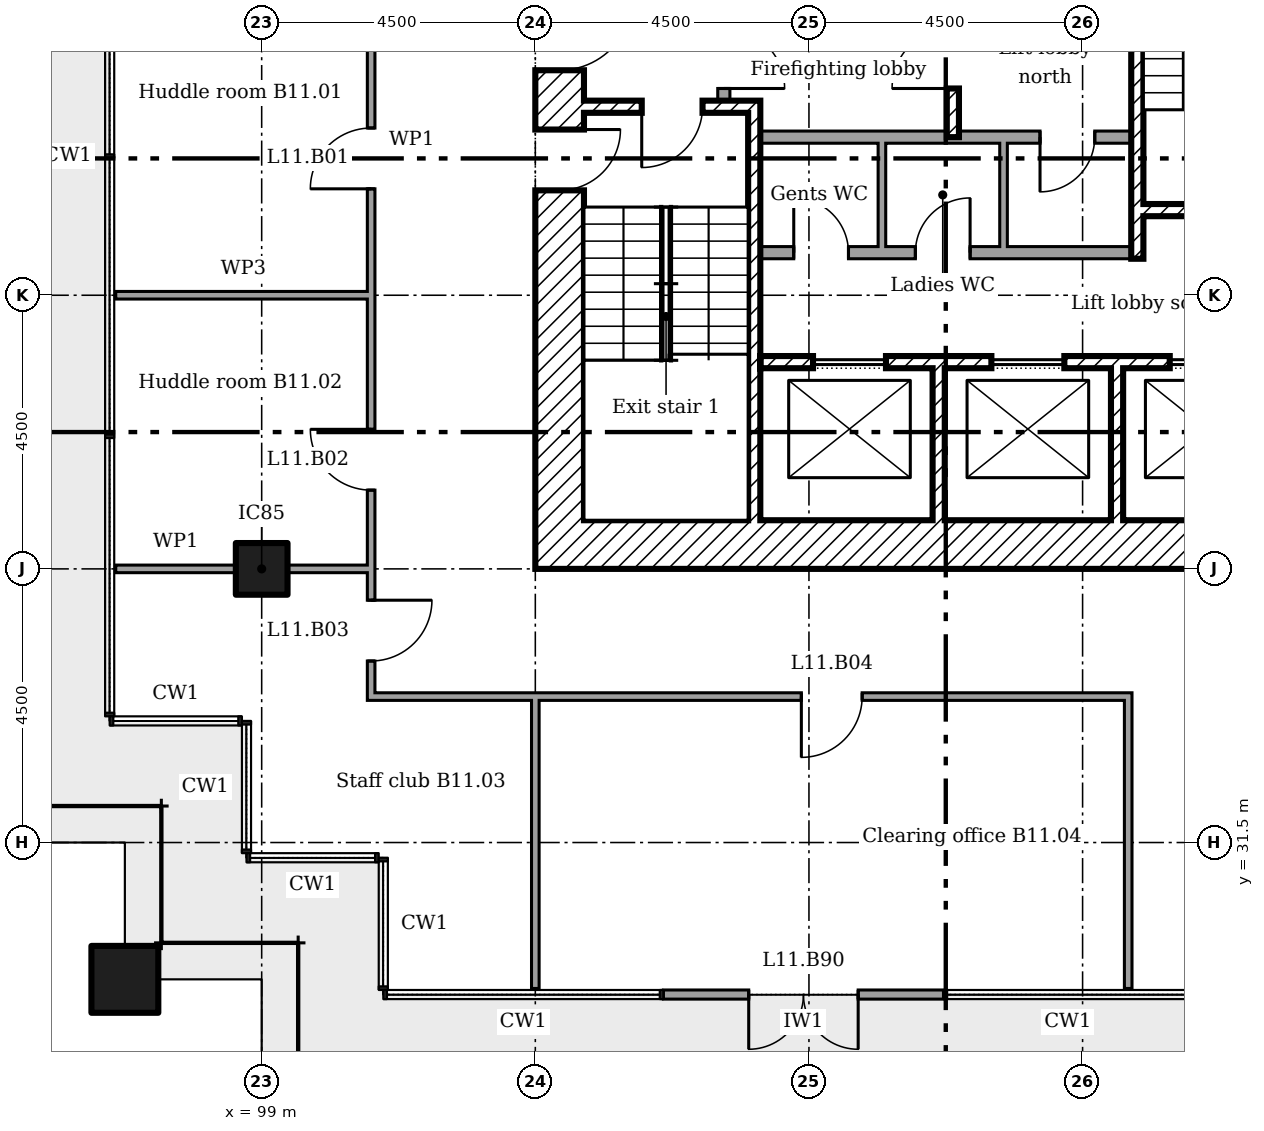
"""IFC4 building model, lengths in metres.
Left out: names, types, materials, properties, quantities, classifications, styles, units other than length and angle.
Written with IfcOpenShell. Run it as: python <this file> out.ifc"""

import sys

from ifc_helpers import new_model, si_unit, direction, frame, frame_2d, origin, origin_2d, place, context, subcontext, project, spatial, rectangle, extrude, element, fill, save


model = new_model("IFC4")
c1 = context("Model", 3, precision=1e-05, world=origin(), true_north=direction((0.0, 1.0)))
c2 = subcontext(c1, "Body", "Model", "MODEL_VIEW")
j1 = project(units=[si_unit("LENGTHUNIT", "METRE"), si_unit("PLANEANGLEUNIT", "RADIAN")], contexts=[c1])
p1 = place(None, origin())
s1 = spatial("IfcSite", under=j1, at=p1, CompositionType="ELEMENT")
p2 = place(p1, origin())
s2 = spatial("IfcBuilding", under=s1, at=p2, CompositionType="ELEMENT")
p3 = place(p2, frame((0.0, 0.0, 51.0)))
s3 = spatial("IfcBuildingStorey", under=s2, at=p3, CompositionType="ELEMENT", Elevation=51.0)
p4 = place(p3, frame((96.75, 29.25, 0.0)))
e1 = element("IfcColumn", 1, at=p4, inside=s3, PredefinedType="COLUMN", context=c2, shape_type="SweptSolid", body=[
    extrude(rectangle(XDim=1.1, YDim=1.1, at=origin_2d()), origin(), (0.0, 0.0, 1.0), 3.6),
])
p5 = place(p3, frame((99.0, 36.0, 0.0)))
e2 = element("IfcColumn", 2, at=p5, inside=s3, PredefinedType="COLUMN", context=c2, shape_type="SweptSolid", body=[
    extrude(rectangle(XDim=0.85, YDim=0.85, at=origin_2d()), origin(), (0.0, 0.0, 1.0), 3.6),
])
p6 = place(p3, frame((105.606, 29.0, 0.0)))
e3 = element("IfcWall", 3, at=p6, inside=s3, PredefinedType="SOLIDWALL", context=c2, shape_type="SweptSolid", body=[
    extrude(rectangle(XDim=4.606, YDim=0.15, at=frame_2d((2.303, 0.0))), origin(), (0.0, 0.0, 1.0), 3.45),
])
p7 = place(p6, frame((1.403, 0.0, 0.0)))
e4 = element("IfcOpeningElement", 4, at=p7, cuts=e3, PredefinedType="OPENING", context=c2, shape_type="SweptSolid", body=[
    extrude(rectangle(XDim=1.8, YDim=2.4, at=frame_2d((0.9, 1.2))), frame((0.0, 0.085, 0.0), z_axis=(0.0, -1.0, 0.0), x_axis=(1.0, 0.0, 0.0)), (0.0, 0.0, 1.0), 0.17),
])
p8 = place(p3, frame((104.3, 36.4, 0.0)))
e5 = element("IfcWall", 5, at=p8, inside=s3, PredefinedType="SHEAR", context=c2, shape_type="SweptSolid", body=[
    extrude(rectangle(XDim=11.9, YDim=0.8, at=frame_2d((5.95, 0.0))), origin(), (0.0, 0.0, 1.0), 3.35),
])
p9 = place(p3, frame((103.9, 36.0, 0.0), z_axis=(0.0, 0.0, 1.0), x_axis=(0.0, 1.0, 0.0)))
e6 = element("IfcWall", 6, at=p9, inside=s3, PredefinedType="SHEAR", context=c2, shape_type="SweptSolid", body=[
    extrude(rectangle(XDim=13.5, YDim=0.8, at=frame_2d((6.75, 0.0))), origin(), (0.0, 0.0, 1.0), 3.35),
])
p10 = place(p9, frame((8.2, 0.0, 0.0)))
e7 = element("IfcOpeningElement", 7, at=p10, cuts=e6, PredefinedType="OPENING", context=c2, shape_type="SweptSolid", body=[
    extrude(rectangle(XDim=1.2, YDim=2.1, at=frame_2d((0.6, 1.05))), frame((0.0, 0.41, 0.0), z_axis=(0.0, -1.0, 0.0), x_axis=(1.0, 0.0, 0.0)), (0.0, 0.0, 1.0), 0.82),
])
p11 = place(p9, frame((6.225, 0.0, 0.0)))
e8 = element("IfcOpeningElement", 8, at=p11, cuts=e6, PredefinedType="OPENING", context=c2, shape_type="SweptSolid", body=[
    extrude(rectangle(XDim=1.0, YDim=2.1, at=frame_2d((0.5, 1.05))), frame((0.0, 0.41, 0.0), z_axis=(0.0, -1.0, 0.0), x_axis=(1.0, 0.0, 0.0)), (0.0, 0.0, 1.0), 0.82),
])
p12 = place(p3, frame((110.367, 48.7, 0.0), z_axis=(0.0, 0.0, 1.0), x_axis=(0.0, -1.0, 0.0)))
e9 = element("IfcWall", 9, at=p12, inside=s3, PredefinedType="SHEAR", context=c2, shape_type="SweptSolid", body=[
    extrude(rectangle(XDim=5.6, YDim=0.2, at=frame_2d((2.8, 0.0))), origin(), (0.0, 0.0, 1.0), 3.35),
])
p13 = place(p12, frame((3.8, 0.0, 0.0)))
e10 = element("IfcOpeningElement", 10, at=p13, cuts=e9, PredefinedType="OPENING", context=c2, shape_type="SweptSolid", body=[
    extrude(rectangle(XDim=1.0, YDim=2.1, at=frame_2d((0.5, 1.05))), frame((0.0, 0.11, 0.0), z_axis=(0.0, -1.0, 0.0), x_axis=(1.0, 0.0, 0.0)), (0.0, 0.0, 1.0), 0.22),
])
for number, where, z_axis, x_axis in (
    (11, (110.133, 36.8, 0.0), (0.0, 0.0, 1.0), (0.0, 1.0, 0.0)),
    (12, (113.067, 36.8, 0.0), (0.0, 0.0, 1.0), (0.0, 1.0, 0.0)),
):
    element("IfcWall", number, at=place(p3, frame(where, z_axis=z_axis, x_axis=x_axis)), inside=s3, PredefinedType="SHEAR", context=c2, shape_type="SweptSolid", body=[
        extrude(rectangle(XDim=2.5, YDim=0.2, at=frame_2d((1.25, 0.0))), origin(), (0.0, 0.0, 1.0), 3.35),
    ])
p14 = place(p3, frame((106.6, 43.7, 0.0), z_axis=(0.0, 0.0, 1.0), x_axis=(0.0, 1.0, 0.0)))
e13 = element("IfcWall", 13, at=p14, inside=s3, PredefinedType="PARTITIONING", context=c2, shape_type="SweptSolid", body=[
    extrude(rectangle(XDim=1.5, YDim=0.2, at=frame_2d((0.75, 0.0))), origin(), (0.0, 0.0, 1.0), 3.35),
])
p15 = place(p14, frame((0.2, 0.0, 0.0)))
e14 = element("IfcOpeningElement", 14, at=p15, cuts=e13, PredefinedType="OPENING", context=c2, shape_type="SweptSolid", body=[
    extrude(rectangle(XDim=1.0, YDim=2.1, at=frame_2d((0.5, 1.05))), frame((0.0, 0.11, 0.0), z_axis=(0.0, -1.0, 0.0), x_axis=(1.0, 0.0, 0.0)), (0.0, 0.0, 1.0), 0.22),
])
p16 = place(p3, frame((107.2, 39.4, 0.0)))
e15 = element("IfcWall", 15, at=p16, inside=s3, PredefinedType="SHEAR", context=c2, shape_type="SweptSolid", body=[
    extrude(rectangle(XDim=9.0, YDim=0.2, at=frame_2d((4.5, 0.0))), origin(), (0.0, 0.0, 1.0), 3.35),
])
p17 = place(p16, frame((0.867, 0.0, 0.0)))
e16 = element("IfcOpeningElement", 16, at=p17, cuts=e15, PredefinedType="OPENING", context=c2, shape_type="SweptSolid", body=[
    extrude(rectangle(XDim=1.2, YDim=2.1, at=frame_2d((0.6, 1.05))), frame((0.0, 0.11, 0.0), z_axis=(0.0, -1.0, 0.0), x_axis=(1.0, 0.0, 0.0)), (0.0, 0.0, 1.0), 0.22),
])
p18 = place(p16, frame((3.8, 0.0, 0.0)))
e17 = element("IfcOpeningElement", 17, at=p18, cuts=e15, PredefinedType="OPENING", context=c2, shape_type="SweptSolid", body=[
    extrude(rectangle(XDim=1.2, YDim=2.1, at=frame_2d((0.6, 1.05))), frame((0.0, 0.11, 0.0), z_axis=(0.0, -1.0, 0.0), x_axis=(1.0, 0.0, 0.0)), (0.0, 0.0, 1.0), 0.22),
])
p19 = place(p16, frame((6.733, 0.0, 0.0)))
e18 = element("IfcOpeningElement", 18, at=p19, cuts=e15, PredefinedType="OPENING", context=c2, shape_type="SweptSolid", body=[
    extrude(rectangle(XDim=1.2, YDim=2.1, at=frame_2d((0.6, 1.05))), frame((0.0, 0.11, 0.0), z_axis=(0.0, -1.0, 0.0), x_axis=(1.0, 0.0, 0.0)), (0.0, 0.0, 1.0), 0.22),
])
p20 = place(p3, frame((107.1, 36.8, 0.0), z_axis=(0.0, 0.0, 1.0), x_axis=(0.0, 1.0, 0.0)))
e19 = element("IfcWall", 19, at=p20, inside=s3, PredefinedType="SHEAR", context=c2, shape_type="SweptSolid", body=[
    extrude(rectangle(XDim=6.9, YDim=0.2, at=frame_2d((3.45, 0.0))), origin(), (0.0, 0.0, 1.0), 3.35),
])
p21 = place(p3, frame((104.3, 43.6, 0.0)))
e20 = element("IfcWall", 20, at=p21, inside=s3, PredefinedType="SHEAR", context=c2, shape_type="SweptSolid", body=[
    extrude(rectangle(XDim=2.7, YDim=0.2, at=frame_2d((1.35, 0.0))), origin(), (0.0, 0.0, 1.0), 3.35),
])
p22 = place(p21, frame((0.95, 0.0, 0.0)))
e21 = element("IfcOpeningElement", 21, at=p22, cuts=e20, PredefinedType="OPENING", context=c2, shape_type="SweptSolid", body=[
    extrude(rectangle(XDim=1.0, YDim=2.1, at=frame_2d((0.5, 1.05))), frame((0.0, 0.11, 0.0), z_axis=(0.0, -1.0, 0.0), x_axis=(1.0, 0.0, 0.0)), (0.0, 0.0, 1.0), 0.22),
])
p23 = place(p3, frame((113.5, 41.9, 0.0)))
e22 = element("IfcWall", 22, at=p23, inside=s3, PredefinedType="SHEAR", context=c2, shape_type="SweptSolid", body=[
    extrude(rectangle(XDim=2.7, YDim=0.2, at=frame_2d((1.35, 0.0))), origin(), (0.0, 0.0, 1.0), 3.35),
])
p24 = place(p23, frame((0.75, 0.0, 0.0)))
e23 = element("IfcOpeningElement", 23, at=p24, cuts=e22, PredefinedType="OPENING", context=c2, shape_type="SweptSolid", body=[
    extrude(rectangle(XDim=1.0, YDim=2.1, at=frame_2d((0.5, 1.05))), frame((0.0, 0.11, 0.0), z_axis=(0.0, -1.0, 0.0), x_axis=(1.0, 0.0, 0.0)), (0.0, 0.0, 1.0), 0.22),
])
p25 = place(p3, frame((113.4, 41.1, 0.0), z_axis=(0.0, 0.0, 1.0), x_axis=(0.0, 1.0, 0.0)))
e24 = element("IfcWall", 24, at=p25, inside=s3, PredefinedType="SHEAR", context=c2, shape_type="SweptSolid", body=[
    extrude(rectangle(XDim=7.6, YDim=0.2, at=frame_2d((3.8, 0.0))), origin(), (0.0, 0.0, 1.0), 3.35),
])
p26 = place(p3, frame((107.2, 43.1, 0.0)))
e25 = element("IfcWall", 25, at=p26, inside=s3, PredefinedType="PARTITIONING", context=c2, shape_type="SweptSolid", body=[
    extrude(rectangle(XDim=6.1, YDim=0.2, at=frame_2d((3.05, 0.0))), origin(), (0.0, 0.0, 1.0), 3.35),
])
p27 = place(p26, frame((4.6, 0.0, 0.0)))
e26 = element("IfcOpeningElement", 26, at=p27, cuts=e25, PredefinedType="OPENING", context=c2, shape_type="SweptSolid", body=[
    extrude(rectangle(XDim=0.9, YDim=2.1, at=frame_2d((0.45, 1.05))), frame((0.0, 0.11, 0.0), z_axis=(0.0, -1.0, 0.0), x_axis=(1.0, 0.0, 0.0)), (0.0, 0.0, 1.0), 0.22),
])
p28 = place(p3, frame((107.2, 41.2, 0.0)))
e27 = element("IfcWall", 27, at=p28, inside=s3, PredefinedType="PARTITIONING", context=c2, shape_type="SweptSolid", body=[
    extrude(rectangle(XDim=6.1, YDim=0.2, at=frame_2d((3.05, 0.0))), origin(), (0.0, 0.0, 1.0), 3.35),
])
p29 = place(p28, frame((0.55, 0.0, 0.0)))
e28 = element("IfcOpeningElement", 28, at=p29, cuts=e27, PredefinedType="OPENING", context=c2, shape_type="SweptSolid", body=[
    extrude(rectangle(XDim=0.9, YDim=2.1, at=frame_2d((0.45, 1.05))), frame((0.0, 0.11, 0.0), z_axis=(0.0, -1.0, 0.0), x_axis=(1.0, 0.0, 0.0)), (0.0, 0.0, 1.0), 0.22),
])
p30 = place(p28, frame((2.55, 0.0, 0.0)))
e29 = element("IfcOpeningElement", 29, at=p30, cuts=e27, PredefinedType="OPENING", context=c2, shape_type="SweptSolid", body=[
    extrude(rectangle(XDim=0.9, YDim=2.1, at=frame_2d((0.45, 1.05))), frame((0.0, 0.11, 0.0), z_axis=(0.0, -1.0, 0.0), x_axis=(1.0, 0.0, 0.0)), (0.0, 0.0, 1.0), 0.22),
])
for number, where, z_axis, x_axis in (
    (30, (109.2, 41.3, 0.0), (0.0, 0.0, 1.0), (0.0, 1.0, 0.0)),
    (31, (111.2, 41.3, 0.0), (0.0, 0.0, 1.0), (0.0, 1.0, 0.0)),
):
    element("IfcWall", number, at=place(p3, frame(where, z_axis=z_axis, x_axis=x_axis)), inside=s3, PredefinedType="PARTITIONING", context=c2, shape_type="SweptSolid", body=[
        extrude(rectangle(XDim=1.7, YDim=0.125, at=frame_2d((0.85, 0.0))), origin(), (0.0, 0.0, 1.0), 3.35),
    ])
p31 = place(p3, frame((100.738, 33.9, 0.0)))
e32 = element("IfcWall", 32, at=p31, inside=s3, PredefinedType="PARTITIONING", context=c2, shape_type="SweptSolid", body=[
    extrude(rectangle(XDim=12.575, YDim=0.125, at=frame_2d((6.288, 0.0))), origin(), (0.0, 0.0, 1.0), 3.45),
])
p32 = place(p31, frame((7.137, 0.0, 0.0)))
e33 = element("IfcOpeningElement", 33, at=p32, cuts=e32, PredefinedType="OPENING", context=c2, shape_type="SweptSolid", body=[
    extrude(rectangle(XDim=1.0, YDim=2.1, at=frame_2d((0.5, 1.05))), frame((0.0, 0.073, 0.0), z_axis=(0.0, -1.0, 0.0), x_axis=(1.0, 0.0, 0.0)), (0.0, 0.0, 1.0), 0.145),
])
p33 = place(p3, frame((96.6, 36.0, 0.0)))
e34 = element("IfcWall", 34, at=p33, inside=s3, PredefinedType="PARTITIONING", context=c2, shape_type="SweptSolid", body=[
    extrude(rectangle(XDim=1.975, YDim=0.125, at=frame_2d((0.987, 0.0))), origin(), (0.0, 0.0, 1.0), 2.842),
])
p34 = place(p3, frame((99.425, 36.0, 0.0)))
e35 = element("IfcWall", 35, at=p34, inside=s3, PredefinedType="PARTITIONING", context=c2, shape_type="SweptSolid", body=[
    extrude(rectangle(XDim=1.375, YDim=0.125, at=frame_2d((0.688, 0.0))), origin(), (0.0, 0.0, 1.0), 2.842),
])
p35 = place(p3, frame((96.6, 40.5, 0.0)))
e36 = element("IfcWall", 36, at=p35, inside=s3, PredefinedType="MOVABLE", context=c2, shape_type="SweptSolid", body=[
    extrude(rectangle(XDim=4.2, YDim=0.125, at=frame_2d((2.1, 0.0))), origin(), (0.0, 0.0, 1.0), 2.851),
])
p36 = place(p3, frame((100.8, 33.962, 0.0), z_axis=(0.0, 0.0, 1.0), x_axis=(0.0, 1.0, 0.0)))
e37 = element("IfcWall", 37, at=p36, inside=s3, PredefinedType="PARTITIONING", context=c2, shape_type="SweptSolid", body=[
    extrude(rectangle(XDim=18.175, YDim=0.125, at=frame_2d((9.087, 0.0))), origin(), (0.0, 0.0, 1.0), 3.45),
])
p37 = place(p36, frame((8.288, 0.0, 0.0)))
e38 = element("IfcOpeningElement", 38, at=p37, cuts=e37, PredefinedType="OPENING", context=c2, shape_type="SweptSolid", body=[
    extrude(rectangle(XDim=1.0, YDim=2.1, at=frame_2d((0.5, 1.05))), frame((0.0, 0.073, 0.0), z_axis=(0.0, -1.0, 0.0), x_axis=(1.0, 0.0, 0.0)), (0.0, 0.0, 1.0), 0.145),
])
p38 = place(p36, frame((3.333, 0.0, 0.0)))
e39 = element("IfcOpeningElement", 39, at=p38, cuts=e37, PredefinedType="OPENING", context=c2, shape_type="SweptSolid", body=[
    extrude(rectangle(XDim=1.0, YDim=2.1, at=frame_2d((0.5, 1.05))), frame((0.0, 0.073, 0.0), z_axis=(0.0, -1.0, 0.0), x_axis=(1.0, 0.0, 0.0)), (0.0, 0.0, 1.0), 0.145),
])
p39 = place(p36, frame((0.522, 0.0, 0.0)))
e40 = element("IfcOpeningElement", 40, at=p39, cuts=e37, PredefinedType="OPENING", context=c2, shape_type="SweptSolid", body=[
    extrude(rectangle(XDim=1.0, YDim=2.1, at=frame_2d((0.5, 1.05))), frame((0.0, 0.073, 0.0), z_axis=(0.0, -1.0, 0.0), x_axis=(1.0, 0.0, 0.0)), (0.0, 0.0, 1.0), 0.145),
])
p40 = place(p36, frame((16.248, 0.0, 0.0)))
e41 = element("IfcOpeningElement", 41, at=p40, cuts=e37, PredefinedType="OPENING", context=c2, shape_type="SweptSolid", body=[
    extrude(rectangle(XDim=1.0, YDim=2.1, at=frame_2d((0.5, 1.05))), frame((0.0, 0.073, 0.0), z_axis=(0.0, -1.0, 0.0), x_axis=(1.0, 0.0, 0.0)), (0.0, 0.0, 1.0), 0.145),
])
p41 = place(p36, frame((13.242, 0.0, 0.0)))
e42 = element("IfcOpeningElement", 42, at=p41, cuts=e37, PredefinedType="OPENING", context=c2, shape_type="SweptSolid", body=[
    extrude(rectangle(XDim=1.0, YDim=2.1, at=frame_2d((0.5, 1.05))), frame((0.0, 0.073, 0.0), z_axis=(0.0, -1.0, 0.0), x_axis=(1.0, 0.0, 0.0)), (0.0, 0.0, 1.0), 0.145),
])
p42 = place(p3, frame((103.5, 29.1, 0.0), z_axis=(0.0, 0.0, 1.0), x_axis=(0.0, 1.0, 0.0)))
e43 = element("IfcWall", 43, at=p42, inside=s3, PredefinedType="PARTITIONING", context=c2, shape_type="SweptSolid", body=[
    extrude(rectangle(XDim=4.8, YDim=0.125, at=frame_2d((2.4, 0.0))), origin(), (0.0, 0.0, 1.0), 2.851),
])
p43 = place(p3, frame((113.25, 29.1, 0.0), z_axis=(0.0, 0.0, 1.0), x_axis=(0.0, 1.0, 0.0)))
e44 = element("IfcWall", 44, at=p43, inside=s3, PredefinedType="PARTITIONING", context=c2, shape_type="SweptSolid", body=[
    extrude(rectangle(XDim=4.737, YDim=0.125, at=frame_2d((2.369, 0.0))), origin(), (0.0, 0.0, 1.0), 3.45),
])
p44 = place(p7, frame((1.8, 0.0, 0.0), x_axis=(-1.0, 0.0, 0.0)))
e45 = element("IfcDoor", 45, at=p44, inside=s3, OperationType="DOUBLE_DOOR_DOUBLE_SWING", PredefinedType="NOTDEFINED", context=c2, shape_type="SweptSolid", body=[
    extrude(rectangle(XDim=1.8, YDim=2.4, at=frame_2d((0.9, 1.2))), frame((0.0, 0.025, 0.0), z_axis=(0.0, -1.0, 0.0), x_axis=(1.0, 0.0, 0.0)), (0.0, 0.0, 1.0), 0.05),
])
fill(e4, e45)
p45 = place(p10, frame((1.2, 0.0, 0.0), x_axis=(-1.0, 0.0, 0.0)))
e46 = element("IfcDoor", 46, at=p45, inside=s3, OperationType="SINGLE_SWING_RIGHT", PredefinedType="DOOR", context=c2, shape_type="SweptSolid", body=[
    extrude(rectangle(XDim=1.2, YDim=2.1, at=frame_2d((0.6, 1.05))), frame((0.0, 0.025, 0.0), z_axis=(0.0, -1.0, 0.0), x_axis=(1.0, 0.0, 0.0)), (0.0, 0.0, 1.0), 0.05),
])
fill(e7, e46)
p46 = place(p22, frame((1.0, 0.0, 0.0), x_axis=(-1.0, 0.0, 0.0)))
e47 = element("IfcDoor", 47, at=p46, inside=s3, OperationType="SINGLE_SWING_LEFT", PredefinedType="DOOR", context=c2, shape_type="SweptSolid", body=[
    extrude(rectangle(XDim=1.0, YDim=2.1, at=frame_2d((0.5, 1.05))), frame((0.0, 0.025, 0.0), z_axis=(0.0, -1.0, 0.0), x_axis=(1.0, 0.0, 0.0)), (0.0, 0.0, 1.0), 0.05),
])
fill(e21, e47)
p47 = place(p11, frame((1.0, 0.0, 0.0), x_axis=(-1.0, 0.0, 0.0)))
e48 = element("IfcDoor", 48, at=p47, inside=s3, OperationType="SINGLE_SWING_RIGHT", PredefinedType="DOOR", context=c2, shape_type="SweptSolid", body=[
    extrude(rectangle(XDim=1.0, YDim=2.1, at=frame_2d((0.5, 1.05))), frame((0.0, 0.025, 0.0), z_axis=(0.0, -1.0, 0.0), x_axis=(1.0, 0.0, 0.0)), (0.0, 0.0, 1.0), 0.05),
])
fill(e8, e48)
p48 = place(p13, frame((1.0, 0.0, 0.0), x_axis=(-1.0, 0.0, 0.0)))
e49 = element("IfcDoor", 49, at=p48, inside=s3, OperationType="SINGLE_SWING_RIGHT", PredefinedType="DOOR", context=c2, shape_type="SweptSolid", body=[
    extrude(rectangle(XDim=1.0, YDim=2.1, at=frame_2d((0.5, 1.05))), frame((0.0, 0.025, 0.0), z_axis=(0.0, -1.0, 0.0), x_axis=(1.0, 0.0, 0.0)), (0.0, 0.0, 1.0), 0.05),
])
fill(e10, e49)
p49 = place(p15, frame((1.0, 0.0, 0.0), x_axis=(-1.0, 0.0, 0.0)))
e50 = element("IfcDoor", 50, at=p49, inside=s3, OperationType="SINGLE_SWING_LEFT", PredefinedType="DOOR", context=c2, shape_type="SweptSolid", body=[
    extrude(rectangle(XDim=1.0, YDim=2.1, at=frame_2d((0.5, 1.05))), frame((0.0, 0.025, 0.0), z_axis=(0.0, -1.0, 0.0), x_axis=(1.0, 0.0, 0.0)), (0.0, 0.0, 1.0), 0.05),
])
fill(e14, e50)
p50 = place(p29, origin())
e51 = element("IfcDoor", 51, at=p50, inside=s3, OperationType="SINGLE_SWING_RIGHT", PredefinedType="DOOR", context=c2, shape_type="SweptSolid", body=[
    extrude(rectangle(XDim=0.9, YDim=2.1, at=frame_2d((0.45, 1.05))), frame((0.0, 0.025, 0.0), z_axis=(0.0, -1.0, 0.0), x_axis=(1.0, 0.0, 0.0)), (0.0, 0.0, 1.0), 0.05),
])
fill(e28, e51)
p51 = place(p30, origin())
e52 = element("IfcDoor", 52, at=p51, inside=s3, OperationType="SINGLE_SWING_LEFT", PredefinedType="DOOR", context=c2, shape_type="SweptSolid", body=[
    extrude(rectangle(XDim=0.9, YDim=2.1, at=frame_2d((0.45, 1.05))), frame((0.0, 0.025, 0.0), z_axis=(0.0, -1.0, 0.0), x_axis=(1.0, 0.0, 0.0)), (0.0, 0.0, 1.0), 0.05),
])
fill(e29, e52)
p52 = place(p27, frame((0.9, 0.0, 0.0), x_axis=(-1.0, 0.0, 0.0)))
e53 = element("IfcDoor", 53, at=p52, inside=s3, OperationType="SINGLE_SWING_LEFT", PredefinedType="DOOR", context=c2, shape_type="SweptSolid", body=[
    extrude(rectangle(XDim=0.9, YDim=2.1, at=frame_2d((0.45, 1.05))), frame((0.0, 0.025, 0.0), z_axis=(0.0, -1.0, 0.0), x_axis=(1.0, 0.0, 0.0)), (0.0, 0.0, 1.0), 0.05),
])
fill(e26, e53)
p53 = place(p17, origin())
e54 = element("IfcDoor", 54, at=p53, inside=s3, OperationType="SLIDING_TO_LEFT", PredefinedType="DOOR", context=c2, shape_type="SweptSolid", body=[
    extrude(rectangle(XDim=1.2, YDim=2.1, at=frame_2d((0.6, 1.05))), frame((0.0, 0.025, 0.0), z_axis=(0.0, -1.0, 0.0), x_axis=(1.0, 0.0, 0.0)), (0.0, 0.0, 1.0), 0.05),
])
fill(e16, e54)
p54 = place(p18, origin())
e55 = element("IfcDoor", 55, at=p54, inside=s3, OperationType="SLIDING_TO_LEFT", PredefinedType="DOOR", context=c2, shape_type="SweptSolid", body=[
    extrude(rectangle(XDim=1.2, YDim=2.1, at=frame_2d((0.6, 1.05))), frame((0.0, 0.025, 0.0), z_axis=(0.0, -1.0, 0.0), x_axis=(1.0, 0.0, 0.0)), (0.0, 0.0, 1.0), 0.05),
])
fill(e17, e55)
p55 = place(p19, origin())
e56 = element("IfcDoor", 56, at=p55, inside=s3, OperationType="SLIDING_TO_LEFT", PredefinedType="DOOR", context=c2, shape_type="SweptSolid", body=[
    extrude(rectangle(XDim=1.2, YDim=2.1, at=frame_2d((0.6, 1.05))), frame((0.0, 0.025, 0.0), z_axis=(0.0, -1.0, 0.0), x_axis=(1.0, 0.0, 0.0)), (0.0, 0.0, 1.0), 0.05),
])
fill(e18, e56)
p56 = place(p37, origin())
e57 = element("IfcDoor", 57, at=p56, inside=s3, OperationType="SINGLE_SWING_RIGHT", PredefinedType="DOOR", context=c2, shape_type="SweptSolid", body=[
    extrude(rectangle(XDim=1.0, YDim=2.1, at=frame_2d((0.5, 1.05))), frame((0.0, 0.025, 0.0), z_axis=(0.0, -1.0, 0.0), x_axis=(1.0, 0.0, 0.0)), (0.0, 0.0, 1.0), 0.05),
])
fill(e38, e57)
p57 = place(p38, origin())
e58 = element("IfcDoor", 58, at=p57, inside=s3, OperationType="SINGLE_SWING_LEFT", PredefinedType="DOOR", context=c2, shape_type="SweptSolid", body=[
    extrude(rectangle(XDim=1.0, YDim=2.1, at=frame_2d((0.5, 1.05))), frame((0.0, 0.025, 0.0), z_axis=(0.0, -1.0, 0.0), x_axis=(1.0, 0.0, 0.0)), (0.0, 0.0, 1.0), 0.05),
])
fill(e39, e58)
p58 = place(p39, frame((1.0, 0.0, 0.0), x_axis=(-1.0, 0.0, 0.0)))
e59 = element("IfcDoor", 59, at=p58, inside=s3, OperationType="SINGLE_SWING_RIGHT", PredefinedType="DOOR", context=c2, shape_type="SweptSolid", body=[
    extrude(rectangle(XDim=1.0, YDim=2.1, at=frame_2d((0.5, 1.05))), frame((0.0, 0.025, 0.0), z_axis=(0.0, -1.0, 0.0), x_axis=(1.0, 0.0, 0.0)), (0.0, 0.0, 1.0), 0.05),
])
fill(e40, e59)
p59 = place(p32, frame((1.0, 0.0, 0.0), x_axis=(-1.0, 0.0, 0.0)))
e60 = element("IfcDoor", 60, at=p59, inside=s3, OperationType="SINGLE_SWING_LEFT", PredefinedType="DOOR", context=c2, shape_type="SweptSolid", body=[
    extrude(rectangle(XDim=1.0, YDim=2.1, at=frame_2d((0.5, 1.05))), frame((0.0, 0.025, 0.0), z_axis=(0.0, -1.0, 0.0), x_axis=(1.0, 0.0, 0.0)), (0.0, 0.0, 1.0), 0.05),
])
fill(e33, e60)
save(model, sys.argv[1])
